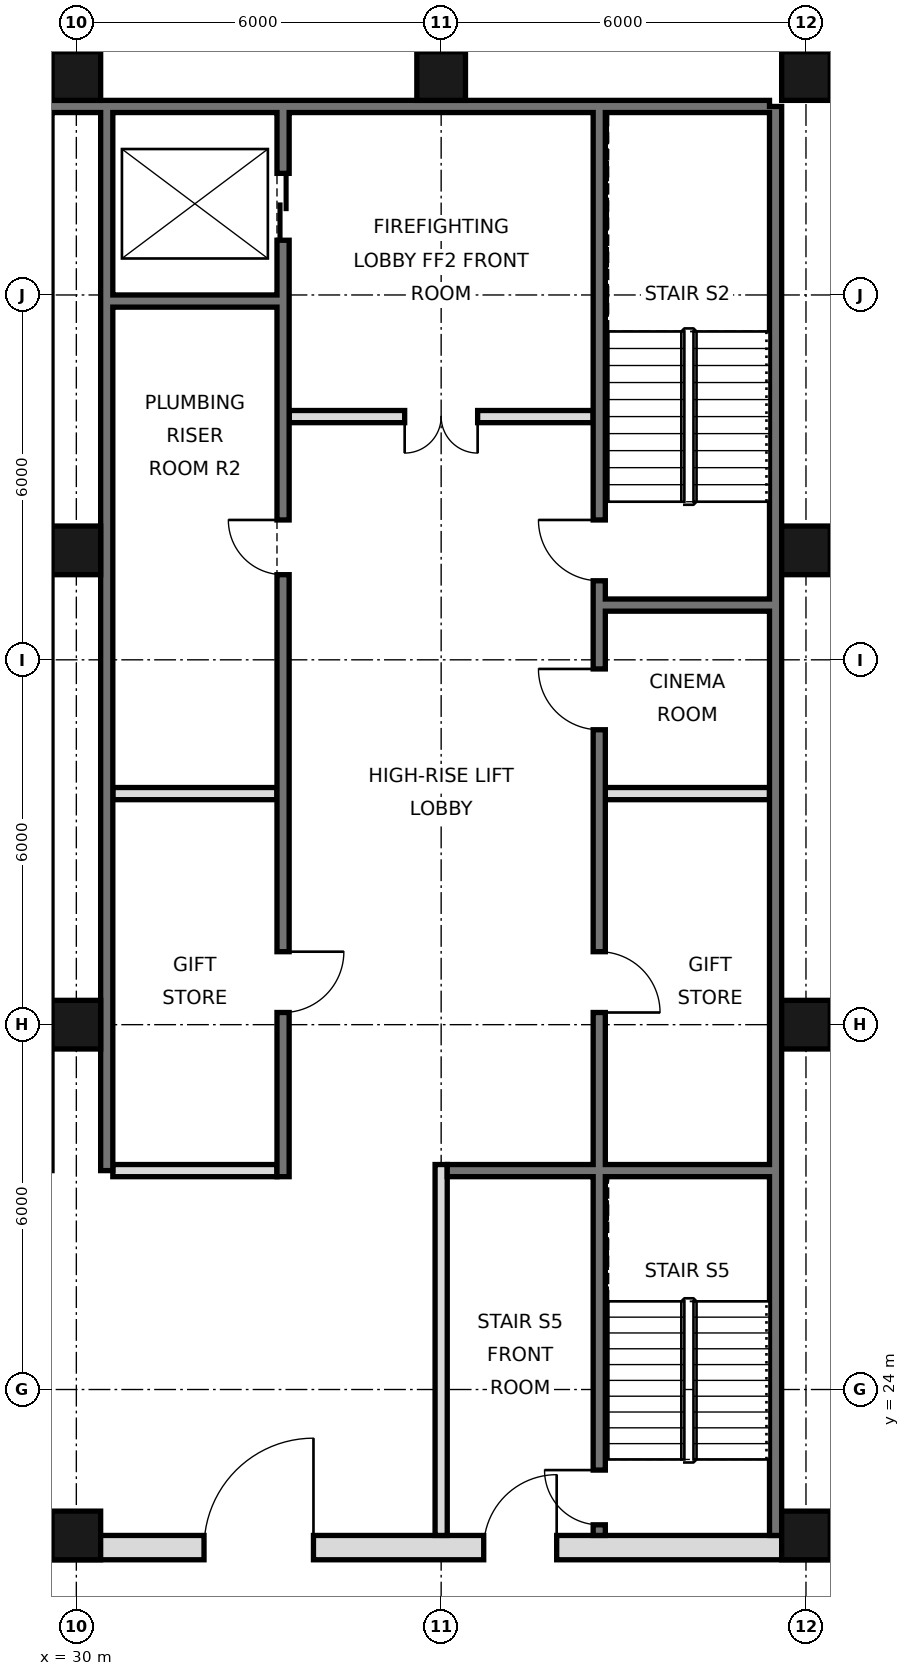
"""IFC4 building model, lengths in metres.
Left out: names, types, materials, properties, quantities, classifications, styles, units other than length and angle.
Written with IfcOpenShell. Run it as: python <this file> out.ifc"""

import sys

from ifc_helpers import new_model, si_unit, direction, frame, frame_2d, origin, origin_2d, place, context, subcontext, project, spatial, rectangle, hollow_rectangle, extrude, element, fill, save


model = new_model("IFC4")
c1 = context("Model", 3, precision=1e-05, world=origin(), true_north=direction((0.0, 1.0)))
c2 = subcontext(c1, "Body", "Model", "MODEL_VIEW")
j1 = project(units=[si_unit("LENGTHUNIT", "METRE"), si_unit("PLANEANGLEUNIT", "RADIAN")], contexts=[c1])
p1 = place(None, origin())
s1 = spatial("IfcSite", under=j1, at=p1, CompositionType="ELEMENT")
p2 = place(p1, origin())
s2 = spatial("IfcBuilding", under=s1, at=p2, CompositionType="ELEMENT")
p3 = place(p2, frame((0.0, 0.0, 64.2)))
s3 = spatial("IfcBuildingStorey", under=s2, at=p3, CompositionType="ELEMENT", Elevation=64.2)
for number, where, z_axis, x_axis in (
    (1, (30.0, 21.6, 0.0), (0.0, 0.0, 1.0), (1.0, 0.0, 0.0)),
    (2, (30.0, 30.0, 0.0), (0.0, 0.0, 1.0), (1.0, 0.0, 0.0)),
    (3, (30.0, 37.8, 0.0), (0.0, 0.0, 1.0), (1.0, 0.0, 0.0)),
    (4, (30.0, 45.6, 0.0), (0.0, 0.0, 1.0), (1.0, 0.0, 0.0)),
    (5, (36.0, 45.6, 0.0), (0.0, 0.0, 1.0), (1.0, 0.0, 0.0)),
    (6, (42.0, 21.6, 0.0), (0.0, 0.0, 1.0), (1.0, 0.0, 0.0)),
    (7, (42.0, 30.0, 0.0), (0.0, 0.0, 1.0), (1.0, 0.0, 0.0)),
    (8, (42.0, 37.8, 0.0), (0.0, 0.0, 1.0), (1.0, 0.0, 0.0)),
    (9, (42.0, 45.6, 0.0), (0.0, 0.0, 1.0), (1.0, 0.0, 0.0)),
):
    element("IfcColumn", number, at=place(p3, frame(where, z_axis=z_axis, x_axis=x_axis)), inside=s3, PredefinedType="COLUMN", context=c2, shape_type="SweptSolid", body=[
        extrude(hollow_rectangle(XDim=0.8, YDim=0.8, WallThickness=0.06, at=origin_2d()), origin(), (0.0, 0.0, 1.0), 3.6),
    ])
p4 = place(p3, frame((41.5, 21.6, 0.0), z_axis=(0.0, 0.0, 1.0), x_axis=(0.0, 1.0, 0.0)))
e10 = element("IfcWall", 10, at=p4, inside=s3, PredefinedType="SOLIDWALL", context=c2, shape_type="SweptSolid", body=[
    extrude(rectangle(XDim=23.5, YDim=0.2, at=frame_2d((11.75, 0.0))), origin(), (0.0, 0.0, 1.0), 3.42),
])
p5 = place(p3, frame((6.6, 45.1, 0.0), z_axis=(0.0, 0.0, 1.0), x_axis=(1.0, 0.0, 0.0)))
e11 = element("IfcWall", 11, at=p5, inside=s3, PredefinedType="SOLIDWALL", context=c2, shape_type="SweptSolid", body=[
    extrude(rectangle(XDim=34.8, YDim=0.2, at=frame_2d((17.4, 0.0))), origin(), (0.0, 0.0, 1.0), 3.42),
])
p6 = place(p3, frame((30.5, 27.6, 0.0), z_axis=(0.0, 0.0, 1.0), x_axis=(0.0, 1.0, 0.0)))
e12 = element("IfcWall", 12, at=p6, inside=s3, PredefinedType="SOLIDWALL", context=c2, shape_type="SweptSolid", body=[
    extrude(rectangle(XDim=17.5, YDim=0.2, at=frame_2d((8.75, 0.0))), origin(), (0.0, 0.0, 1.0), 3.42),
])
p7 = place(p3, frame((5.6, 21.4, 0.0), z_axis=(0.0, 0.0, 1.0), x_axis=(1.0, 0.0, 0.0)))
e13 = element("IfcWall", 13, at=p7, inside=s3, PredefinedType="SOLIDWALL", context=c2, shape_type="SweptSolid", body=[
    extrude(rectangle(XDim=36.8, YDim=0.4, at=frame_2d((18.4, 0.0))), origin(), (0.0, 0.0, 1.0), 3.42),
])
p8 = place(p7, frame((8.5, 0.0, 0.0)))
e14 = element("IfcOpeningElement", 14, at=p8, cuts=e13, PredefinedType="OPENING", context=c2, shape_type="SweptSolid", body=[
    extrude(rectangle(XDim=1.8, YDim=2.1, at=frame_2d((0.9, 1.05))), frame((0.0, 0.21, 0.0), z_axis=(0.0, -1.0, 0.0), x_axis=(1.0, 0.0, 0.0)), (0.0, 0.0, 1.0), 0.42),
])
p9 = place(p7, frame((17.5, 0.0, 0.0)))
e15 = element("IfcOpeningElement", 15, at=p9, cuts=e13, PredefinedType="OPENING", context=c2, shape_type="SweptSolid", body=[
    extrude(rectangle(XDim=1.8, YDim=2.1, at=frame_2d((0.9, 1.05))), frame((0.0, 0.21, 0.0), z_axis=(0.0, -1.0, 0.0), x_axis=(1.0, 0.0, 0.0)), (0.0, 0.0, 1.0), 0.42),
])
p10 = place(p7, frame((26.5, 0.0, 0.0)))
e16 = element("IfcOpeningElement", 16, at=p10, cuts=e13, PredefinedType="OPENING", context=c2, shape_type="SweptSolid", body=[
    extrude(rectangle(XDim=1.8, YDim=2.1, at=frame_2d((0.9, 1.05))), frame((0.0, 0.21, 0.0), z_axis=(0.0, -1.0, 0.0), x_axis=(1.0, 0.0, 0.0)), (0.0, 0.0, 1.0), 0.42),
])
p11 = place(p7, frame((4.5, 0.0, 0.0)))
e17 = element("IfcOpeningElement", 17, at=p11, cuts=e13, PredefinedType="OPENING", context=c2, shape_type="SweptSolid", body=[
    extrude(rectangle(XDim=1.2, YDim=2.1, at=frame_2d((0.6, 1.05))), frame((0.0, 0.21, 0.0), z_axis=(0.0, -1.0, 0.0), x_axis=(1.0, 0.0, 0.0)), (0.0, 0.0, 1.0), 0.42),
])
p12 = place(p7, frame((31.1, 0.0, 0.0)))
e18 = element("IfcOpeningElement", 18, at=p12, cuts=e13, PredefinedType="OPENING", context=c2, shape_type="SweptSolid", body=[
    extrude(rectangle(XDim=1.2, YDim=2.1, at=frame_2d((0.6, 1.05))), frame((0.0, 0.21, 0.0), z_axis=(0.0, -1.0, 0.0), x_axis=(1.0, 0.0, 0.0)), (0.0, 0.0, 1.0), 0.42),
])
p13 = place(p3, frame((33.4, 27.5, 0.0), z_axis=(0.0, 0.0, 1.0), x_axis=(0.0, 1.0, 0.0)))
e19 = element("IfcWall", 19, at=p13, inside=s3, PredefinedType="SOLIDWALL", context=c2, shape_type="SweptSolid", body=[
    extrude(rectangle(XDim=17.5, YDim=0.2, at=frame_2d((8.75, 0.0))), origin(), (0.0, 0.0, 1.0), 3.42),
])
p14 = place(p13, frame((15.4, 0.0, 0.0)))
e20 = element("IfcOpeningElement", 20, at=p14, cuts=e19, PredefinedType="OPENING", context=c2, shape_type="SweptSolid", body=[
    extrude(rectangle(XDim=1.1, YDim=2.1, at=frame_2d((0.55, 1.05))), frame((0.0, 0.11, 0.0), z_axis=(0.0, -1.0, 0.0), x_axis=(1.0, 0.0, 0.0)), (0.0, 0.0, 1.0), 0.22),
])
p15 = place(p13, frame((2.7, 0.0, 0.0)))
e21 = element("IfcOpeningElement", 21, at=p15, cuts=e19, PredefinedType="OPENING", context=c2, shape_type="SweptSolid", body=[
    extrude(rectangle(XDim=1.0, YDim=2.1, at=frame_2d((0.5, 1.05))), frame((0.0, 0.11, 0.0), z_axis=(0.0, -1.0, 0.0), x_axis=(1.0, 0.0, 0.0)), (0.0, 0.0, 1.0), 0.22),
])
p16 = place(p13, frame((9.9, 0.0, 0.0)))
e22 = element("IfcOpeningElement", 22, at=p16, cuts=e19, PredefinedType="OPENING", context=c2, shape_type="SweptSolid", body=[
    extrude(rectangle(XDim=0.9, YDim=2.1, at=frame_2d((0.45, 1.05))), frame((0.0, 0.11, 0.0), z_axis=(0.0, -1.0, 0.0), x_axis=(1.0, 0.0, 0.0)), (0.0, 0.0, 1.0), 0.22),
])
p17 = place(p3, frame((36.0, 21.6, 0.0), z_axis=(0.0, 0.0, 1.0), x_axis=(0.0, 1.0, 0.0)))
e23 = element("IfcWall", 23, at=p17, inside=s3, PredefinedType="PARTITIONING", context=c2, shape_type="SweptSolid", body=[
    extrude(rectangle(XDim=6.1, YDim=0.2, at=frame_2d((3.05, 0.0))), origin(), (0.0, 0.0, 1.0), 3.42),
])
p18 = place(p3, frame((38.6, 21.6, 0.0), z_axis=(0.0, 0.0, 1.0), x_axis=(0.0, 1.0, 0.0)))
e24 = element("IfcWall", 24, at=p18, inside=s3, PredefinedType="SOLIDWALL", context=c2, shape_type="SweptSolid", body=[
    extrude(rectangle(XDim=23.4, YDim=0.2, at=frame_2d((11.7, 0.0))), origin(), (0.0, 0.0, 1.0), 3.42),
])
p19 = place(p18, frame((8.6, 0.0, 0.0)))
e25 = element("IfcOpeningElement", 25, at=p19, cuts=e24, PredefinedType="OPENING", context=c2, shape_type="SweptSolid", body=[
    extrude(rectangle(XDim=1.0, YDim=2.1, at=frame_2d((0.5, 1.05))), frame((0.0, 0.11, 0.0), z_axis=(0.0, -1.0, 0.0), x_axis=(1.0, 0.0, 0.0)), (0.0, 0.0, 1.0), 0.22),
])
p20 = place(p18, frame((13.25, 0.0, 0.0)))
e26 = element("IfcOpeningElement", 26, at=p20, cuts=e24, PredefinedType="OPENING", context=c2, shape_type="SweptSolid", body=[
    extrude(rectangle(XDim=1.0, YDim=2.1, at=frame_2d((0.5, 1.05))), frame((0.0, 0.11, 0.0), z_axis=(0.0, -1.0, 0.0), x_axis=(1.0, 0.0, 0.0)), (0.0, 0.0, 1.0), 0.22),
])
p21 = place(p18, frame((15.7, 0.0, 0.0)))
e27 = element("IfcOpeningElement", 27, at=p21, cuts=e24, PredefinedType="OPENING", context=c2, shape_type="SweptSolid", body=[
    extrude(rectangle(XDim=1.0, YDim=2.1, at=frame_2d((0.5, 1.05))), frame((0.0, 0.11, 0.0), z_axis=(0.0, -1.0, 0.0), x_axis=(1.0, 0.0, 0.0)), (0.0, 0.0, 1.0), 0.22),
])
p22 = place(p18, frame((0.175, 0.0, 0.0)))
e28 = element("IfcOpeningElement", 28, at=p22, cuts=e24, PredefinedType="OPENING", context=c2, shape_type="SweptSolid", body=[
    extrude(rectangle(XDim=0.9, YDim=2.1, at=frame_2d((0.45, 1.05))), frame((0.0, 0.11, 0.0), z_axis=(0.0, -1.0, 0.0), x_axis=(1.0, 0.0, 0.0)), (0.0, 0.0, 1.0), 0.22),
])
p23 = place(p3, frame((30.6, 27.6, 0.0), z_axis=(0.0, 0.0, 1.0), x_axis=(1.0, 0.0, 0.0)))
e29 = element("IfcWall", 29, at=p23, inside=s3, PredefinedType="PARTITIONING", context=c2, shape_type="SweptSolid", body=[
    extrude(rectangle(XDim=2.7, YDim=0.2, at=frame_2d((1.35, 0.0))), origin(), (0.0, 0.0, 1.0), 3.42),
])
p24 = place(p3, frame((36.1, 27.6, 0.0), z_axis=(0.0, 0.0, 1.0), x_axis=(1.0, 0.0, 0.0)))
e30 = element("IfcWall", 30, at=p24, inside=s3, PredefinedType="SOLIDWALL", context=c2, shape_type="SweptSolid", body=[
    extrude(rectangle(XDim=5.3, YDim=0.2, at=frame_2d((2.65, 0.0))), origin(), (0.0, 0.0, 1.0), 3.42),
])
p25 = place(p3, frame((30.6, 33.8, 0.0), z_axis=(0.0, 0.0, 1.0), x_axis=(1.0, 0.0, 0.0)))
e31 = element("IfcWall", 31, at=p25, inside=s3, PredefinedType="SOLIDWALL", context=c2, shape_type="SweptSolid", body=[
    extrude(rectangle(XDim=2.7, YDim=0.2, at=frame_2d((1.35, 0.0))), origin(), (0.0, 0.0, 1.0), 3.42),
])
p26 = place(p3, frame((38.7, 33.8, 0.0), z_axis=(0.0, 0.0, 1.0), x_axis=(1.0, 0.0, 0.0)))
e32 = element("IfcWall", 32, at=p26, inside=s3, PredefinedType="PARTITIONING", context=c2, shape_type="SweptSolid", body=[
    extrude(rectangle(XDim=2.7, YDim=0.2, at=frame_2d((1.35, 0.0))), origin(), (0.0, 0.0, 1.0), 3.42),
])
p27 = place(p3, frame((38.7, 36.9, 0.0), z_axis=(0.0, 0.0, 1.0), x_axis=(1.0, 0.0, 0.0)))
e33 = element("IfcWall", 33, at=p27, inside=s3, PredefinedType="SOLIDWALL", context=c2, shape_type="SweptSolid", body=[
    extrude(rectangle(XDim=2.7, YDim=0.2, at=frame_2d((1.35, 0.0))), origin(), (0.0, 0.0, 1.0), 3.42),
])
p28 = place(p3, frame((33.5, 40.0, 0.0), z_axis=(0.0, 0.0, 1.0), x_axis=(1.0, 0.0, 0.0)))
e34 = element("IfcWall", 34, at=p28, inside=s3, PredefinedType="PARTITIONING", context=c2, shape_type="SweptSolid", body=[
    extrude(rectangle(XDim=5.0, YDim=0.2, at=frame_2d((2.5, 0.0))), origin(), (0.0, 0.0, 1.0), 3.42),
])
p29 = place(p28, frame((1.9, 0.0, 0.0)))
e35 = element("IfcOpeningElement", 35, at=p29, cuts=e34, PredefinedType="OPENING", context=c2, shape_type="SweptSolid", body=[
    extrude(rectangle(XDim=1.2, YDim=2.1, at=frame_2d((0.6, 1.05))), frame((0.0, 0.11, 0.0), z_axis=(0.0, -1.0, 0.0), x_axis=(1.0, 0.0, 0.0)), (0.0, 0.0, 1.0), 0.22),
])
p30 = place(p3, frame((30.6, 41.9, 0.0), z_axis=(0.0, 0.0, 1.0), x_axis=(1.0, 0.0, 0.0)))
e36 = element("IfcWall", 36, at=p30, inside=s3, PredefinedType="SOLIDWALL", context=c2, shape_type="SweptSolid", body=[
    extrude(rectangle(XDim=2.7, YDim=0.2, at=frame_2d((1.35, 0.0))), origin(), (0.0, 0.0, 1.0), 3.42),
])
p31 = place(p10, frame((1.8, 0.0, 0.0), z_axis=(0.0, 0.0, 1.0), x_axis=(-1.0, 0.0, 0.0)))
e37 = element("IfcDoor", 37, at=p31, inside=s3, OperationType="SINGLE_SWING_LEFT", PredefinedType="DOOR", context=c2, shape_type="SweptSolid", body=[
    extrude(rectangle(XDim=1.8, YDim=2.1, at=frame_2d((0.9, 1.05))), frame((0.0, 0.025, 0.0), z_axis=(0.0, -1.0, 0.0), x_axis=(1.0, 0.0, 0.0)), (0.0, 0.0, 1.0), 0.05),
])
fill(e16, e37)
p32 = place(p12, frame((1.2, 0.0, 0.0), z_axis=(0.0, 0.0, 1.0), x_axis=(-1.0, 0.0, 0.0)))
e38 = element("IfcDoor", 38, at=p32, inside=s3, OperationType="SINGLE_SWING_LEFT", PredefinedType="DOOR", context=c2, shape_type="SweptSolid", body=[
    extrude(rectangle(XDim=1.2, YDim=2.1, at=frame_2d((0.6, 1.05))), frame((0.0, 0.025, 0.0), z_axis=(0.0, -1.0, 0.0), x_axis=(1.0, 0.0, 0.0)), (0.0, 0.0, 1.0), 0.05),
])
fill(e18, e38)
p33 = place(p29, frame((1.2, 0.0, 0.0), z_axis=(0.0, 0.0, 1.0), x_axis=(-1.0, 0.0, 0.0)))
e39 = element("IfcDoor", 39, at=p33, inside=s3, OperationType="DOUBLE_DOOR_SINGLE_SWING", PredefinedType="DOOR", context=c2, shape_type="SweptSolid", body=[
    extrude(rectangle(XDim=1.2, YDim=2.1, at=frame_2d((0.6, 1.05))), frame((0.0, 0.025, 0.0), z_axis=(0.0, -1.0, 0.0), x_axis=(1.0, 0.0, 0.0)), (0.0, 0.0, 1.0), 0.05),
])
fill(e35, e39)
p34 = place(p14, origin())
e40 = element("IfcDoor", 40, at=p34, inside=s3, OperationType="DOUBLE_DOOR_SLIDING", PredefinedType="DOOR", context=c2, shape_type="SweptSolid", body=[
    extrude(rectangle(XDim=1.1, YDim=2.1, at=frame_2d((0.55, 1.05))), frame((0.0, 0.025, 0.0), z_axis=(0.0, -1.0, 0.0), x_axis=(1.0, 0.0, 0.0)), (0.0, 0.0, 1.0), 0.05),
])
fill(e20, e40)
p35 = place(p19, frame((1.0, 0.0, 0.0), z_axis=(0.0, 0.0, 1.0), x_axis=(-1.0, 0.0, 0.0)))
e41 = element("IfcDoor", 41, at=p35, inside=s3, OperationType="SINGLE_SWING_RIGHT", PredefinedType="DOOR", context=c2, shape_type="SweptSolid", body=[
    extrude(rectangle(XDim=1.0, YDim=2.1, at=frame_2d((0.5, 1.05))), frame((0.0, 0.025, 0.0), z_axis=(0.0, -1.0, 0.0), x_axis=(1.0, 0.0, 0.0)), (0.0, 0.0, 1.0), 0.05),
])
fill(e25, e41)
p36 = place(p20, frame((1.0, 0.0, 0.0), z_axis=(0.0, 0.0, 1.0), x_axis=(-1.0, 0.0, 0.0)))
e42 = element("IfcDoor", 42, at=p36, inside=s3, OperationType="SINGLE_SWING_LEFT", PredefinedType="DOOR", context=c2, shape_type="SweptSolid", body=[
    extrude(rectangle(XDim=1.0, YDim=2.1, at=frame_2d((0.5, 1.05))), frame((0.0, 0.025, 0.0), z_axis=(0.0, -1.0, 0.0), x_axis=(1.0, 0.0, 0.0)), (0.0, 0.0, 1.0), 0.05),
])
fill(e26, e42)
p37 = place(p15, origin())
e43 = element("IfcDoor", 43, at=p37, inside=s3, OperationType="SINGLE_SWING_RIGHT", PredefinedType="DOOR", context=c2, shape_type="SweptSolid", body=[
    extrude(rectangle(XDim=1.0, YDim=2.1, at=frame_2d((0.5, 1.05))), frame((0.0, 0.025, 0.0), z_axis=(0.0, -1.0, 0.0), x_axis=(1.0, 0.0, 0.0)), (0.0, 0.0, 1.0), 0.05),
])
fill(e21, e43)
p38 = place(p21, frame((1.0, 0.0, 0.0), z_axis=(0.0, 0.0, 1.0), x_axis=(-1.0, 0.0, 0.0)))
e44 = element("IfcDoor", 44, at=p38, inside=s3, OperationType="SINGLE_SWING_LEFT", PredefinedType="DOOR", context=c2, shape_type="SweptSolid", body=[
    extrude(rectangle(XDim=1.0, YDim=2.1, at=frame_2d((0.5, 1.05))), frame((0.0, 0.025, 0.0), z_axis=(0.0, -1.0, 0.0), x_axis=(1.0, 0.0, 0.0)), (0.0, 0.0, 1.0), 0.05),
])
fill(e27, e44)
p39 = place(p22, frame((0.9, 0.0, 0.0), z_axis=(0.0, 0.0, 1.0), x_axis=(-1.0, 0.0, 0.0)))
e45 = element("IfcDoor", 45, at=p39, inside=s3, OperationType="SINGLE_SWING_LEFT", PredefinedType="DOOR", context=c2, shape_type="SweptSolid", body=[
    extrude(rectangle(XDim=0.9, YDim=2.1, at=frame_2d((0.45, 1.05))), frame((0.0, 0.025, 0.0), z_axis=(0.0, -1.0, 0.0), x_axis=(1.0, 0.0, 0.0)), (0.0, 0.0, 1.0), 0.05),
])
fill(e28, e45)
p40 = place(p16, frame((0.9, 0.0, 0.0), z_axis=(0.0, 0.0, 1.0), x_axis=(-1.0, 0.0, 0.0)))
e46 = element("IfcDoor", 46, at=p40, inside=s3, OperationType="SINGLE_SWING_LEFT", PredefinedType="DOOR", context=c2, shape_type="SweptSolid", body=[
    extrude(rectangle(XDim=0.9, YDim=2.1, at=frame_2d((0.45, 1.05))), frame((0.0, 0.025, 0.0), z_axis=(0.0, -1.0, 0.0), x_axis=(1.0, 0.0, 0.0)), (0.0, 0.0, 1.0), 0.05),
])
fill(e22, e46)
save(model, sys.argv[1])
